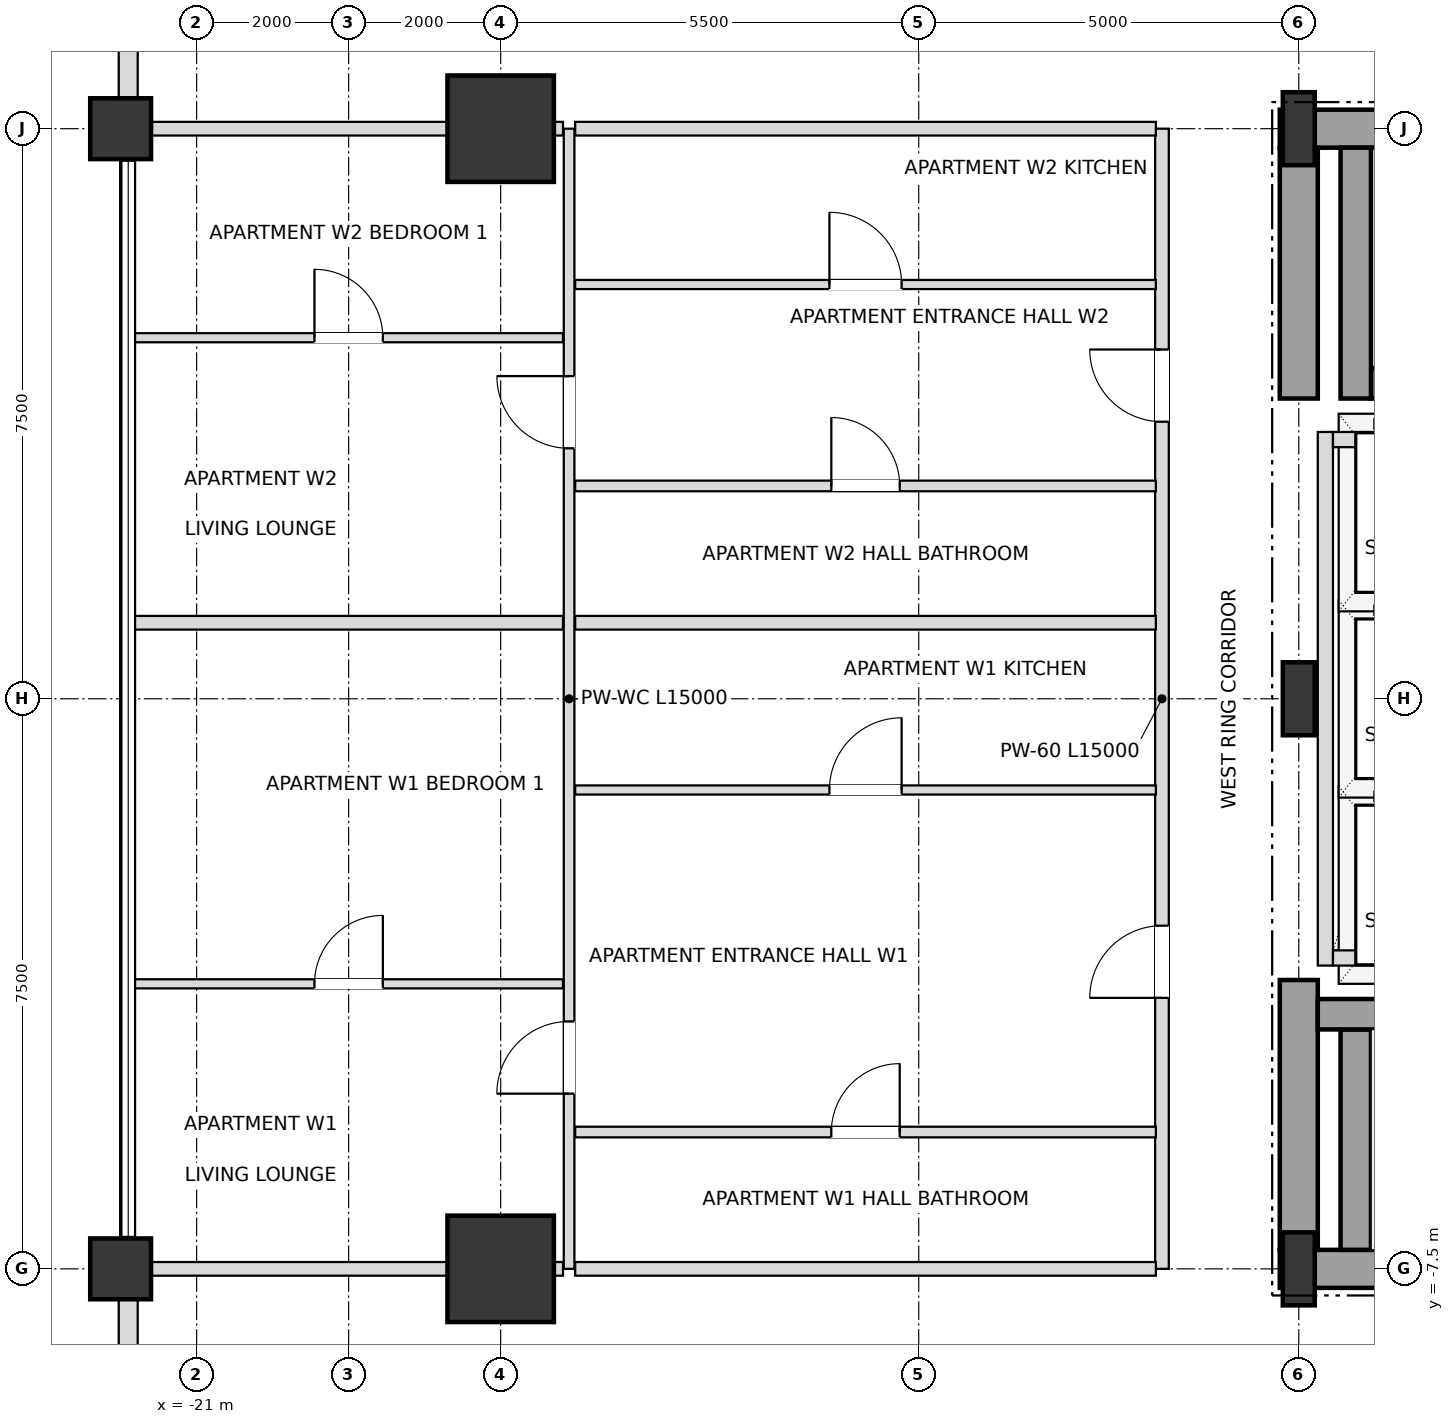
"""IFC4 building model, lengths in metres.
Left out: names, types, materials, properties, quantities, classifications, styles, units other than length and angle.
Written with IfcOpenShell. Run it as: python <this file> out.ifc"""

import sys

from ifc_helpers import new_model, si_unit, direction, frame, frame_2d, origin, origin_2d, place, context, subcontext, project, spatial, rectangle, i_section, extrude, element, fill, save


model = new_model("IFC4")
c1 = context("Model", 3, precision=1e-05, world=origin(), true_north=direction((0.0, 1.0)))
c2 = subcontext(c1, "Body", "Model", "MODEL_VIEW")
j1 = project(units=[si_unit("LENGTHUNIT", "METRE"), si_unit("PLANEANGLEUNIT", "RADIAN")], contexts=[c1])
p1 = place(None, origin())
s1 = spatial("IfcSite", under=j1, at=p1, CompositionType="ELEMENT")
p2 = place(p1, origin())
s2 = spatial("IfcBuilding", under=s1, at=p2, CompositionType="ELEMENT")
p3 = place(p2, frame((0.0, 0.0, 54.0)))
s3 = spatial("IfcBuildingStorey", under=s2, at=p3, CompositionType="ELEMENT", Elevation=54.0)
for number, where, z_axis, x_axis in (
    (1, (-6.5, -7.5, 0.0), (0.0, 0.0, 1.0), (1.0, 0.0, 0.0)),
    (2, (-6.5, 0.0, 0.0), (0.0, 0.0, 1.0), (1.0, 0.0, 0.0)),
    (3, (-6.5, 7.5, 0.0), (0.0, 0.0, 1.0), (1.0, 0.0, 0.0)),
):
    element("IfcColumn", number, at=place(p3, frame(where, z_axis=z_axis, x_axis=x_axis)), inside=s3, PredefinedType="COLUMN", context=c2, shape_type="SweptSolid", body=[
        extrude(i_section(OverallWidth=0.42, OverallDepth=0.96, WebThickness=0.022, FlangeThickness=0.034, at=origin_2d()), origin(), (0.0, 0.0, 1.0), 3.6),
    ])
for number, where, z_axis, x_axis in (
    (4, (-17.0, 7.5, 0.0), (0.0, 0.0, 1.0), (1.0, 0.0, 0.0)),
    (5, (-17.0, -7.5, 0.0), (0.0, 0.0, 1.0), (1.0, 0.0, 0.0)),
):
    element("IfcColumn", number, at=place(p3, frame(where, z_axis=z_axis, x_axis=x_axis)), inside=s3, PredefinedType="USERDEFINED", context=c2, shape_type="SweptSolid", body=[
        extrude(rectangle(XDim=1.4, YDim=1.4, at=origin_2d()), origin(), (0.0, 0.0, 1.0), 3.6),
    ])
for number, where, z_axis, x_axis in (
    (6, (-22.0, -7.5, 0.0), (0.0, 0.0, 1.0), (1.0, 0.0, 0.0)),
    (7, (-22.0, 7.5, 0.0), (0.0, 0.0, 1.0), (1.0, 0.0, 0.0)),
):
    element("IfcColumn", number, at=place(p3, frame(where, z_axis=z_axis, x_axis=x_axis)), inside=s3, PredefinedType="COLUMN", context=c2, shape_type="SweptSolid", body=[
        extrude(rectangle(XDim=0.8, YDim=0.8, at=origin_2d()), origin(), (0.0, 0.0, 1.0), 3.6),
    ])
p4 = place(p3, frame((-21.9, 12.605, 0.0), z_axis=(0.0, 0.0, 1.0), x_axis=(0.0, -1.0, 0.0)))
e8 = element("IfcWall", 8, at=p4, inside=s3, PredefinedType="SOLIDWALL", context=c2, shape_type="SweptSolid", body=[
    extrude(rectangle(XDim=4.71, YDim=0.25, at=frame_2d((2.355, 0.0))), origin(), (0.0, 0.0, 1.0), 2.736),
])
p5 = place(p4, frame((1.455, 0.0, 0.72)))
e9 = element("IfcOpeningElement", 9, at=p5, cuts=e8, PredefinedType="OPENING", context=c2, shape_type="SweptSolid", body=[
    extrude(rectangle(XDim=1.8, YDim=1.68, at=frame_2d((0.9, 0.84))), frame((0.0, 0.135, 0.0), z_axis=(0.0, -1.0, 0.0), x_axis=(1.0, 0.0, 0.0)), (0.0, 0.0, 1.0), 0.27),
])
p6 = place(p3, frame((-21.9, -7.895, 0.0), z_axis=(0.0, 0.0, 1.0), x_axis=(0.0, -1.0, 0.0)))
e10 = element("IfcWall", 10, at=p6, inside=s3, PredefinedType="SOLIDWALL", context=c2, shape_type="SweptSolid", body=[
    extrude(rectangle(XDim=4.71, YDim=0.25, at=frame_2d((2.355, 0.0))), origin(), (0.0, 0.0, 1.0), 2.736),
])
p7 = place(p6, frame((1.455, 0.0, 0.72)))
e11 = element("IfcOpeningElement", 11, at=p7, cuts=e10, PredefinedType="OPENING", context=c2, shape_type="SweptSolid", body=[
    extrude(rectangle(XDim=1.8, YDim=1.68, at=frame_2d((0.9, 0.84))), frame((0.0, 0.135, 0.0), z_axis=(0.0, -1.0, 0.0), x_axis=(1.0, 0.0, 0.0)), (0.0, 0.0, 1.0), 0.27),
])
p8 = place(p3, frame((-6.75, -7.5, 0.0), z_axis=(0.0, 0.0, 1.0), x_axis=(1.0, 0.0, 0.0)))
e12 = element("IfcWall", 12, at=p8, inside=s3, PredefinedType="SHEAR", context=c2, shape_type="SweptSolid", body=[
    extrude(rectangle(XDim=6.75, YDim=0.5, at=frame_2d((3.375, 0.0))), origin(), (0.0, 0.0, 1.0), 3.38),
])
p9 = place(p3, frame((-6.75, 7.5, 0.0), z_axis=(0.0, 0.0, 1.0), x_axis=(1.0, 0.0, 0.0)))
e13 = element("IfcWall", 13, at=p9, inside=s3, PredefinedType="SHEAR", context=c2, shape_type="SweptSolid", body=[
    extrude(rectangle(XDim=6.75, YDim=0.5, at=frame_2d((3.375, 0.0))), origin(), (0.0, 0.0, 1.0), 3.38),
])
p10 = place(p9, frame((1.65, 0.0, 0.0)))
e14 = element("IfcOpeningElement", 14, at=p10, cuts=e13, PredefinedType="OPENING", context=c2, shape_type="SweptSolid", body=[
    extrude(rectangle(XDim=1.05, YDim=2.15, at=frame_2d((0.525, 1.075))), frame((0.0, 0.26, 0.0), z_axis=(0.0, -1.0, 0.0), x_axis=(1.0, 0.0, 0.0)), (0.0, 0.0, 1.0), 0.52),
])
p11 = place(p3, frame((-6.5, -7.25, 0.0), z_axis=(0.0, 0.0, 1.0), x_axis=(0.0, 1.0, 0.0)))
e15 = element("IfcWall", 15, at=p11, inside=s3, PredefinedType="SHEAR", context=c2, shape_type="SweptSolid", body=[
    extrude(rectangle(XDim=3.55, YDim=0.5, at=frame_2d((1.775, 0.0))), origin(), (0.0, 0.0, 1.0), 3.38),
])
p12 = place(p3, frame((-6.5, 3.95, 0.0), z_axis=(0.0, 0.0, 1.0), x_axis=(0.0, 1.0, 0.0)))
e16 = element("IfcWall", 16, at=p12, inside=s3, PredefinedType="SHEAR", context=c2, shape_type="SweptSolid", body=[
    extrude(rectangle(XDim=3.3, YDim=0.5, at=frame_2d((1.65, 0.0))), origin(), (0.0, 0.0, 1.0), 3.38),
])
p13 = place(p3, frame((-5.75, -7.25, 0.0), z_axis=(0.0, 0.0, 1.0), x_axis=(0.0, 1.0, 0.0)))
e17 = element("IfcWall", 17, at=p13, inside=s3, PredefinedType="SHEAR", context=c2, shape_type="SweptSolid", body=[
    extrude(rectangle(XDim=2.9, YDim=0.4, at=frame_2d((1.45, 0.0))), origin(), (0.0, 0.0, 1.0), 3.38),
])
p14 = place(p3, frame((-6.25, -4.15, 0.0), z_axis=(0.0, 0.0, 1.0), x_axis=(1.0, 0.0, 0.0)))
e18 = element("IfcWall", 18, at=p14, inside=s3, PredefinedType="SHEAR", context=c2, shape_type="SweptSolid", body=[
    extrude(rectangle(XDim=7.78, YDim=0.4, at=frame_2d((3.89, 0.0))), origin(), (0.0, 0.0, 1.0), 3.38),
])
p15 = place(p3, frame((-5.55, 4.15, 0.0), z_axis=(0.0, 0.0, 1.0), x_axis=(1.0, 0.0, 0.0)))
e19 = element("IfcWall", 19, at=p15, inside=s3, PredefinedType="SHEAR", context=c2, shape_type="SweptSolid", body=[
    extrude(rectangle(XDim=7.08, YDim=0.4, at=frame_2d((3.54, 0.0))), origin(), (0.0, 0.0, 1.0), 3.38),
])
p16 = place(p3, frame((-5.75, 3.95, 0.0), z_axis=(0.0, 0.0, 1.0), x_axis=(0.0, 1.0, 0.0)))
e20 = element("IfcWall", 20, at=p16, inside=s3, PredefinedType="SHEAR", context=c2, shape_type="SweptSolid", body=[
    extrude(rectangle(XDim=3.3, YDim=0.4, at=frame_2d((1.65, 0.0))), origin(), (0.0, 0.0, 1.0), 3.38),
])
p17 = place(p3, frame((-6.15, -3.51, 0.0), z_axis=(0.0, 0.0, 1.0), x_axis=(0.0, 1.0, 0.0)))
e21 = element("IfcWall", 21, at=p17, inside=s3, PredefinedType="SOLIDWALL", context=c2, shape_type="SweptSolid", body=[
    extrude(rectangle(XDim=7.02, YDim=0.2, at=frame_2d((3.51, 0.0))), origin(), (0.0, 0.0, 1.0), 3.38),
])
for number, where, z_axis, x_axis in (
    (22, (-6.05, -3.41, 0.0), (0.0, 0.0, 1.0), (1.0, 0.0, 0.0)),
    (23, (-6.05, 3.41, 0.0), (0.0, 0.0, 1.0), (1.0, 0.0, 0.0)),
):
    element("IfcWall", number, at=place(p3, frame(where, z_axis=z_axis, x_axis=x_axis)), inside=s3, PredefinedType="SOLIDWALL", context=c2, shape_type="SweptSolid", body=[
        extrude(rectangle(XDim=2.2, YDim=0.2, at=frame_2d((1.1, 0.0))), origin(), (0.0, 0.0, 1.0), 3.38),
    ])
p18 = place(p3, frame((-16.1, -7.5, 0.0), z_axis=(0.0, 0.0, 1.0), x_axis=(0.0, 1.0, 0.0)))
e24 = element("IfcWall", 24, at=p18, inside=s3, PredefinedType="PARTITIONING", context=c2, shape_type="SweptSolid", body=[
    extrude(rectangle(XDim=15.0, YDim=0.14, at=frame_2d((7.5, 0.0))), origin(), (0.0, 0.0, 1.0), 3.38),
])
p19 = place(p18, frame((2.305, 0.0, 0.0)))
e25 = element("IfcOpeningElement", 25, at=p19, cuts=e24, PredefinedType="OPENING", context=c2, shape_type="SweptSolid", body=[
    extrude(rectangle(XDim=0.95, YDim=2.1, at=frame_2d((0.475, 1.05))), frame((0.0, 0.08, 0.0), z_axis=(0.0, -1.0, 0.0), x_axis=(1.0, 0.0, 0.0)), (0.0, 0.0, 1.0), 0.16),
])
p20 = place(p18, frame((10.795, 0.0, 0.0)))
e26 = element("IfcOpeningElement", 26, at=p20, cuts=e24, PredefinedType="OPENING", context=c2, shape_type="SweptSolid", body=[
    extrude(rectangle(XDim=0.95, YDim=2.1, at=frame_2d((0.475, 1.05))), frame((0.0, 0.08, 0.0), z_axis=(0.0, -1.0, 0.0), x_axis=(1.0, 0.0, 0.0)), (0.0, 0.0, 1.0), 0.16),
])
p21 = place(p3, frame((-8.3, -7.5, 0.0), z_axis=(0.0, 0.0, 1.0), x_axis=(0.0, 1.0, 0.0)))
e27 = element("IfcWall", 27, at=p21, inside=s3, PredefinedType="PARTITIONING", context=c2, shape_type="SweptSolid", body=[
    extrude(rectangle(XDim=15.0, YDim=0.18, at=frame_2d((7.5, 0.0))), origin(), (0.0, 0.0, 1.0), 3.38),
])
p22 = place(p21, frame((3.565, 0.0, 0.0)))
e28 = element("IfcOpeningElement", 28, at=p22, cuts=e27, PredefinedType="OPENING", context=c2, shape_type="SweptSolid", body=[
    extrude(rectangle(XDim=0.95, YDim=2.15, at=frame_2d((0.475, 1.075))), frame((0.0, 0.1, 0.0), z_axis=(0.0, -1.0, 0.0), x_axis=(1.0, 0.0, 0.0)), (0.0, 0.0, 1.0), 0.2),
])
p23 = place(p21, frame((11.145, 0.0, 0.0)))
e29 = element("IfcOpeningElement", 29, at=p23, cuts=e27, PredefinedType="OPENING", context=c2, shape_type="SweptSolid", body=[
    extrude(rectangle(XDim=0.95, YDim=2.15, at=frame_2d((0.475, 1.075))), frame((0.0, 0.1, 0.0), z_axis=(0.0, -1.0, 0.0), x_axis=(1.0, 0.0, 0.0)), (0.0, 0.0, 1.0), 0.2),
])
p24 = place(p3, frame((-21.9, -7.5, 0.0), z_axis=(0.0, 0.0, 1.0), x_axis=(1.0, 0.0, 0.0)))
e30 = element("IfcWall", 30, at=p24, inside=s3, PredefinedType="PARTITIONING", context=c2, shape_type="SweptSolid", body=[
    extrude(rectangle(XDim=5.72, YDim=0.18, at=frame_2d((2.86, 0.0))), origin(), (0.0, 0.0, 1.0), 2.816),
])
p25 = place(p3, frame((-16.02, -7.5, 0.0), z_axis=(0.0, 0.0, 1.0), x_axis=(1.0, 0.0, 0.0)))
e31 = element("IfcWall", 31, at=p25, inside=s3, PredefinedType="PARTITIONING", context=c2, shape_type="SweptSolid", body=[
    extrude(rectangle(XDim=7.64, YDim=0.18, at=frame_2d((3.82, 0.0))), origin(), (0.0, 0.0, 1.0), 2.816),
])
p26 = place(p3, frame((-16.02, -5.7, 0.0), z_axis=(0.0, 0.0, 1.0), x_axis=(1.0, 0.0, 0.0)))
e32 = element("IfcWall", 32, at=p26, inside=s3, PredefinedType="PARTITIONING", context=c2, shape_type="SweptSolid", body=[
    extrude(rectangle(XDim=7.64, YDim=0.14, at=frame_2d((3.82, 0.0))), origin(), (0.0, 0.0, 1.0), 2.948),
])
p27 = place(p26, frame((3.37, 0.0, 0.0)))
e33 = element("IfcOpeningElement", 33, at=p27, cuts=e32, PredefinedType="OPENING", context=c2, shape_type="SweptSolid", body=[
    extrude(rectangle(XDim=0.9, YDim=2.1, at=frame_2d((0.45, 1.05))), frame((0.0, 0.08, 0.0), z_axis=(0.0, -1.0, 0.0), x_axis=(1.0, 0.0, 0.0)), (0.0, 0.0, 1.0), 0.16),
])
p28 = place(p3, frame((-21.82, -3.75, 0.0), z_axis=(0.0, 0.0, 1.0), x_axis=(1.0, 0.0, 0.0)))
e34 = element("IfcWall", 34, at=p28, inside=s3, PredefinedType="PARTITIONING", context=c2, shape_type="SweptSolid", body=[
    extrude(rectangle(XDim=5.64, YDim=0.12, at=frame_2d((2.82, 0.0))), origin(), (0.0, 0.0, 1.0), 2.816),
])
p29 = place(p28, frame((2.37, 0.0, 0.0)))
e35 = element("IfcOpeningElement", 35, at=p29, cuts=e34, PredefinedType="OPENING", context=c2, shape_type="SweptSolid", body=[
    extrude(rectangle(XDim=0.9, YDim=2.1, at=frame_2d((0.45, 1.05))), frame((0.0, 0.07, 0.0), z_axis=(0.0, -1.0, 0.0), x_axis=(1.0, 0.0, 0.0)), (0.0, 0.0, 1.0), 0.14),
])
p30 = place(p3, frame((-16.02, -1.2, 0.0), z_axis=(0.0, 0.0, 1.0), x_axis=(1.0, 0.0, 0.0)))
e36 = element("IfcWall", 36, at=p30, inside=s3, PredefinedType="PARTITIONING", context=c2, shape_type="SweptSolid", body=[
    extrude(rectangle(XDim=7.64, YDim=0.12, at=frame_2d((3.82, 0.0))), origin(), (0.0, 0.0, 1.0), 2.948),
])
p31 = place(p30, frame((3.345, 0.0, 0.0)))
e37 = element("IfcOpeningElement", 37, at=p31, cuts=e36, PredefinedType="OPENING", context=c2, shape_type="SweptSolid", body=[
    extrude(rectangle(XDim=0.95, YDim=2.1, at=frame_2d((0.475, 1.05))), frame((0.0, 0.07, 0.0), z_axis=(0.0, -1.0, 0.0), x_axis=(1.0, 0.0, 0.0)), (0.0, 0.0, 1.0), 0.14),
])
p32 = place(p3, frame((-21.82, 1.0, 0.0), z_axis=(0.0, 0.0, 1.0), x_axis=(1.0, 0.0, 0.0)))
e38 = element("IfcWall", 38, at=p32, inside=s3, PredefinedType="PARTITIONING", context=c2, shape_type="SweptSolid", body=[
    extrude(rectangle(XDim=5.64, YDim=0.18, at=frame_2d((2.82, 0.0))), origin(), (0.0, 0.0, 1.0), 2.816),
])
p33 = place(p3, frame((-16.02, 1.0, 0.0), z_axis=(0.0, 0.0, 1.0), x_axis=(1.0, 0.0, 0.0)))
e39 = element("IfcWall", 39, at=p33, inside=s3, PredefinedType="PARTITIONING", context=c2, shape_type="SweptSolid", body=[
    extrude(rectangle(XDim=7.64, YDim=0.18, at=frame_2d((3.82, 0.0))), origin(), (0.0, 0.0, 1.0), 2.948),
])
p34 = place(p3, frame((-16.02, 2.8, 0.0), z_axis=(0.0, 0.0, 1.0), x_axis=(1.0, 0.0, 0.0)))
e40 = element("IfcWall", 40, at=p34, inside=s3, PredefinedType="PARTITIONING", context=c2, shape_type="SweptSolid", body=[
    extrude(rectangle(XDim=7.64, YDim=0.14, at=frame_2d((3.82, 0.0))), origin(), (0.0, 0.0, 1.0), 2.948),
])
p35 = place(p34, frame((3.37, 0.0, 0.0)))
e41 = element("IfcOpeningElement", 41, at=p35, cuts=e40, PredefinedType="OPENING", context=c2, shape_type="SweptSolid", body=[
    extrude(rectangle(XDim=0.9, YDim=2.1, at=frame_2d((0.45, 1.05))), frame((0.0, 0.08, 0.0), z_axis=(0.0, -1.0, 0.0), x_axis=(1.0, 0.0, 0.0)), (0.0, 0.0, 1.0), 0.16),
])
p36 = place(p3, frame((-21.82, 4.75, 0.0), z_axis=(0.0, 0.0, 1.0), x_axis=(1.0, 0.0, 0.0)))
e42 = element("IfcWall", 42, at=p36, inside=s3, PredefinedType="PARTITIONING", context=c2, shape_type="SweptSolid", body=[
    extrude(rectangle(XDim=5.64, YDim=0.12, at=frame_2d((2.82, 0.0))), origin(), (0.0, 0.0, 1.0), 2.816),
])
p37 = place(p36, frame((2.37, 0.0, 0.0)))
e43 = element("IfcOpeningElement", 43, at=p37, cuts=e42, PredefinedType="OPENING", context=c2, shape_type="SweptSolid", body=[
    extrude(rectangle(XDim=0.9, YDim=2.1, at=frame_2d((0.45, 1.05))), frame((0.0, 0.07, 0.0), z_axis=(0.0, -1.0, 0.0), x_axis=(1.0, 0.0, 0.0)), (0.0, 0.0, 1.0), 0.14),
])
p38 = place(p3, frame((-16.02, 5.45, 0.0), z_axis=(0.0, 0.0, 1.0), x_axis=(1.0, 0.0, 0.0)))
e44 = element("IfcWall", 44, at=p38, inside=s3, PredefinedType="PARTITIONING", context=c2, shape_type="SweptSolid", body=[
    extrude(rectangle(XDim=7.64, YDim=0.12, at=frame_2d((3.82, 0.0))), origin(), (0.0, 0.0, 1.0), 2.948),
])
p39 = place(p38, frame((3.345, 0.0, 0.0)))
e45 = element("IfcOpeningElement", 45, at=p39, cuts=e44, PredefinedType="OPENING", context=c2, shape_type="SweptSolid", body=[
    extrude(rectangle(XDim=0.95, YDim=2.1, at=frame_2d((0.475, 1.05))), frame((0.0, 0.07, 0.0), z_axis=(0.0, -1.0, 0.0), x_axis=(1.0, 0.0, 0.0)), (0.0, 0.0, 1.0), 0.14),
])
p40 = place(p3, frame((-21.9, 7.5, 0.0), z_axis=(0.0, 0.0, 1.0), x_axis=(1.0, 0.0, 0.0)))
e46 = element("IfcWall", 46, at=p40, inside=s3, PredefinedType="PARTITIONING", context=c2, shape_type="SweptSolid", body=[
    extrude(rectangle(XDim=5.72, YDim=0.18, at=frame_2d((2.86, 0.0))), origin(), (0.0, 0.0, 1.0), 2.816),
])
p41 = place(p3, frame((-16.02, 7.5, 0.0), z_axis=(0.0, 0.0, 1.0), x_axis=(1.0, 0.0, 0.0)))
e47 = element("IfcWall", 47, at=p41, inside=s3, PredefinedType="PARTITIONING", context=c2, shape_type="SweptSolid", body=[
    extrude(rectangle(XDim=7.64, YDim=0.18, at=frame_2d((3.82, 0.0))), origin(), (0.0, 0.0, 1.0), 2.816),
])
p42 = place(p27, origin())
e48 = element("IfcDoor", 48, at=p42, inside=s3, OperationType="SINGLE_SWING_RIGHT", PredefinedType="DOOR", context=c2, shape_type="SweptSolid", body=[
    extrude(rectangle(XDim=0.9, YDim=2.1, at=frame_2d((0.45, 1.05))), frame((0.0, 0.025, 0.0), z_axis=(0.0, -1.0, 0.0), x_axis=(1.0, 0.0, 0.0)), (0.0, 0.0, 1.0), 0.05),
])
fill(e33, e48)
p43 = place(p22, origin())
e49 = element("IfcDoor", 49, at=p43, inside=s3, OperationType="SINGLE_SWING_LEFT", PredefinedType="DOOR", context=c2, shape_type="SweptSolid", body=[
    extrude(rectangle(XDim=0.95, YDim=2.15, at=frame_2d((0.475, 1.075))), frame((0.0, 0.025, 0.0), z_axis=(0.0, -1.0, 0.0), x_axis=(1.0, 0.0, 0.0)), (0.0, 0.0, 1.0), 0.05),
])
fill(e28, e49)
p44 = place(p31, origin())
e50 = element("IfcDoor", 50, at=p44, inside=s3, OperationType="SINGLE_SWING_RIGHT", PredefinedType="DOOR", context=c2, shape_type="SweptSolid", body=[
    extrude(rectangle(XDim=0.95, YDim=2.1, at=frame_2d((0.475, 1.05))), frame((0.0, 0.025, 0.0), z_axis=(0.0, -1.0, 0.0), x_axis=(1.0, 0.0, 0.0)), (0.0, 0.0, 1.0), 0.05),
])
fill(e37, e50)
p45 = place(p19, origin())
e51 = element("IfcDoor", 51, at=p45, inside=s3, OperationType="SINGLE_SWING_LEFT", PredefinedType="DOOR", context=c2, shape_type="SweptSolid", body=[
    extrude(rectangle(XDim=0.95, YDim=2.1, at=frame_2d((0.475, 1.05))), frame((0.0, 0.025, 0.0), z_axis=(0.0, -1.0, 0.0), x_axis=(1.0, 0.0, 0.0)), (0.0, 0.0, 1.0), 0.05),
])
fill(e25, e51)
p46 = place(p29, origin())
e52 = element("IfcDoor", 52, at=p46, inside=s3, OperationType="SINGLE_SWING_RIGHT", PredefinedType="DOOR", context=c2, shape_type="SweptSolid", body=[
    extrude(rectangle(XDim=0.9, YDim=2.1, at=frame_2d((0.45, 1.05))), frame((0.0, 0.025, 0.0), z_axis=(0.0, -1.0, 0.0), x_axis=(1.0, 0.0, 0.0)), (0.0, 0.0, 1.0), 0.05),
])
fill(e35, e52)
p47 = place(p35, origin())
e53 = element("IfcDoor", 53, at=p47, inside=s3, OperationType="SINGLE_SWING_LEFT", PredefinedType="DOOR", context=c2, shape_type="SweptSolid", body=[
    extrude(rectangle(XDim=0.9, YDim=2.1, at=frame_2d((0.45, 1.05))), frame((0.0, 0.025, 0.0), z_axis=(0.0, -1.0, 0.0), x_axis=(1.0, 0.0, 0.0)), (0.0, 0.0, 1.0), 0.05),
])
fill(e41, e53)
p48 = place(p23, origin())
e54 = element("IfcDoor", 54, at=p48, inside=s3, OperationType="SINGLE_SWING_RIGHT", PredefinedType="DOOR", context=c2, shape_type="SweptSolid", body=[
    extrude(rectangle(XDim=0.95, YDim=2.15, at=frame_2d((0.475, 1.075))), frame((0.0, 0.025, 0.0), z_axis=(0.0, -1.0, 0.0), x_axis=(1.0, 0.0, 0.0)), (0.0, 0.0, 1.0), 0.05),
])
fill(e29, e54)
p49 = place(p39, origin())
e55 = element("IfcDoor", 55, at=p49, inside=s3, OperationType="SINGLE_SWING_LEFT", PredefinedType="DOOR", context=c2, shape_type="SweptSolid", body=[
    extrude(rectangle(XDim=0.95, YDim=2.1, at=frame_2d((0.475, 1.05))), frame((0.0, 0.025, 0.0), z_axis=(0.0, -1.0, 0.0), x_axis=(1.0, 0.0, 0.0)), (0.0, 0.0, 1.0), 0.05),
])
fill(e45, e55)
p50 = place(p20, origin())
e56 = element("IfcDoor", 56, at=p50, inside=s3, OperationType="SINGLE_SWING_RIGHT", PredefinedType="DOOR", context=c2, shape_type="SweptSolid", body=[
    extrude(rectangle(XDim=0.95, YDim=2.1, at=frame_2d((0.475, 1.05))), frame((0.0, 0.025, 0.0), z_axis=(0.0, -1.0, 0.0), x_axis=(1.0, 0.0, 0.0)), (0.0, 0.0, 1.0), 0.05),
])
fill(e26, e56)
p51 = place(p37, origin())
e57 = element("IfcDoor", 57, at=p51, inside=s3, OperationType="SINGLE_SWING_LEFT", PredefinedType="DOOR", context=c2, shape_type="SweptSolid", body=[
    extrude(rectangle(XDim=0.9, YDim=2.1, at=frame_2d((0.45, 1.05))), frame((0.0, 0.025, 0.0), z_axis=(0.0, -1.0, 0.0), x_axis=(1.0, 0.0, 0.0)), (0.0, 0.0, 1.0), 0.05),
])
fill(e43, e57)
save(model, sys.argv[1])
